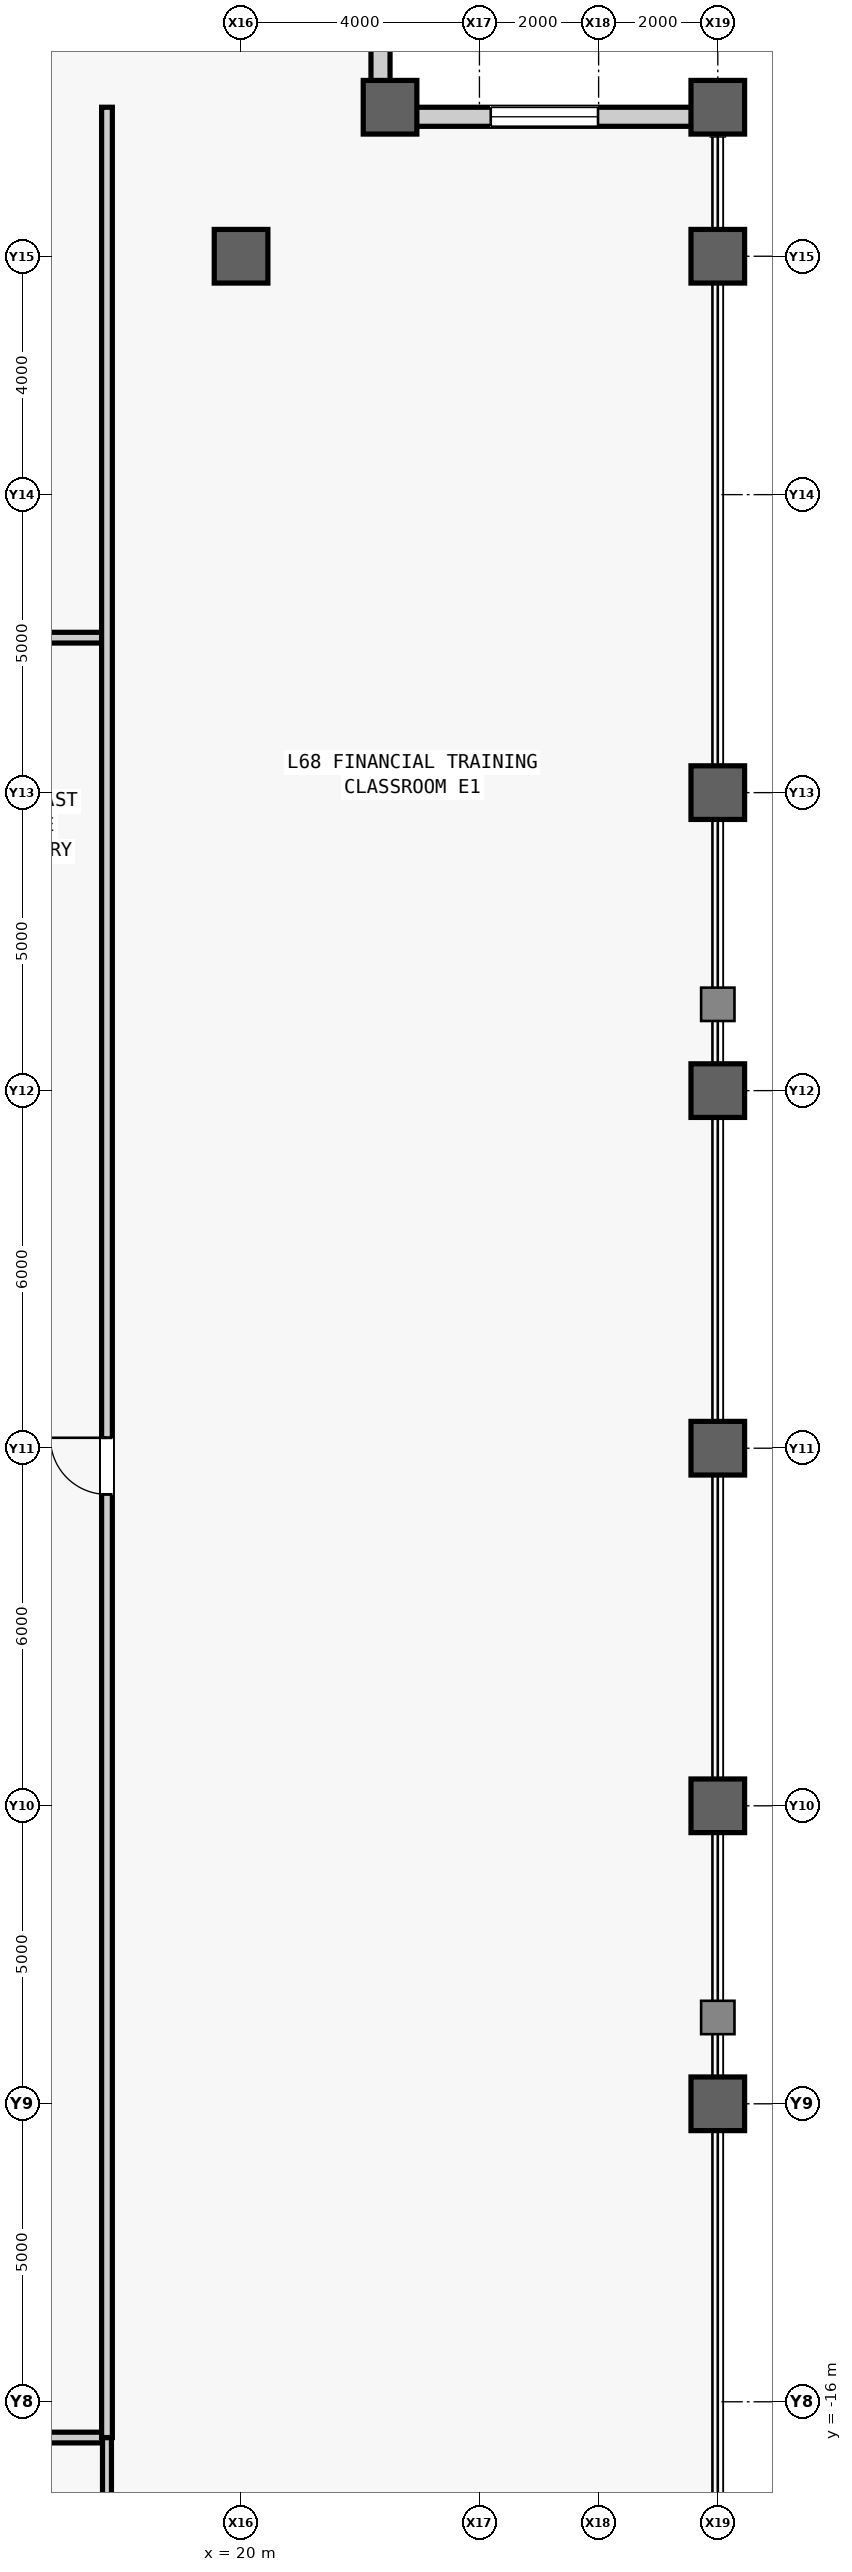
"""IFC4 building model, lengths in metres.
Left out: names, types, materials, properties, quantities, classifications, styles, units other than length and angle.
Written with IfcOpenShell. Run it as: python <this file> out.ifc"""

import sys

from ifc_helpers import new_model, si_unit, direction, frame, frame_2d, origin, origin_2d, place, context, subcontext, project, spatial, rectangle, hollow_rectangle, extrude, source, transform, mapped, element, fill, save


model = new_model("IFC4")
c1 = context("Model", 3, precision=1e-05, world=origin(), true_north=direction((0.0, 1.0)))
c2 = subcontext(c1, "Body", "Model", "MODEL_VIEW")
j1 = project(units=[si_unit("LENGTHUNIT", "METRE"), si_unit("PLANEANGLEUNIT", "RADIAN")], contexts=[c1])
p1 = place(None, origin())
s1 = spatial("IfcSite", under=j1, at=p1, CompositionType="ELEMENT")
p2 = place(p1, origin())
s2 = spatial("IfcBuilding", under=s1, at=p2, CompositionType="ELEMENT")
p3 = place(p2, frame((0.0, 0.0, 289.5)))
s3 = spatial("IfcBuildingStorey", under=s2, at=p3, CompositionType="ELEMENT", Elevation=289.5)
m1 = source(origin(), c2, "Body", "SweptSolid", [
    extrude(hollow_rectangle(XDim=0.9, YDim=0.9, WallThickness=0.05, at=origin_2d()), origin(), (0.0, 0.0, 1.0), 4.0),
])
for number, where, z_axis, x_axis in (
    (1, (20.0, 20.0, 0.0), (0.0, 0.0, 1.0), (1.0, 0.0, 0.0)),
    (2, (22.5, 22.5, 0.0), (0.0, 0.0, 1.0), (1.0, 0.0, 0.0)),
    (3, (28.0, -11.0, 0.0), (0.0, 0.0, 1.0), (1.0, 0.0, 0.0)),
    (4, (28.0, -6.0, 0.0), (0.0, 0.0, 1.0), (1.0, 0.0, 0.0)),
    (5, (28.0, 0.0, 0.0), (0.0, 0.0, 1.0), (1.0, 0.0, 0.0)),
    (6, (28.0, 6.0, 0.0), (0.0, 0.0, 1.0), (1.0, 0.0, 0.0)),
    (7, (28.0, 11.0, 0.0), (0.0, 0.0, 1.0), (1.0, 0.0, 0.0)),
    (8, (28.0, 20.0, 0.0), (0.0, 0.0, 1.0), (1.0, 0.0, 0.0)),
    (9, (28.0, 22.5, 0.0), (0.0, 0.0, 1.0), (1.0, 0.0, 0.0)),
):
    element("IfcColumn", number, at=place(p3, frame(where, z_axis=z_axis, x_axis=x_axis)), inside=s3, PredefinedType="COLUMN", context=c2, shape_type="MappedRepresentation", body=[
        mapped(m1, transform((0.0, 0.0, 0.0), scale=1.0)),
    ])
m2 = source(origin(), c2, "Body", "SweptSolid", [
    extrude(rectangle(XDim=5.18, YDim=0.32, at=frame_2d((2.59, 0.0))), origin(), (0.0, 0.0, 1.0), 3.231),
])
p4 = place(p3, frame((22.5, 22.34, 0.0), z_axis=(0.0, 0.0, 1.0), x_axis=(1.0, 0.0, 0.0)))
e10 = element("IfcWall", 10, at=p4, inside=s3, PredefinedType="STANDARD", context=c2, shape_type="MappedRepresentation", body=[
    mapped(m2, transform((0.0, 0.0, 0.0), scale=1.0)),
])
m3 = source(origin(), c2, "Body", "SweptSolid", [
    extrude(rectangle(XDim=1.8, YDim=2.4, at=frame_2d((0.9, 1.2))), frame((0.0, 0.17, 0.0), z_axis=(0.0, -1.0, 0.0), x_axis=(1.0, 0.0, 0.0)), (0.0, 0.0, 1.0), 0.34),
])
p5 = place(p4, frame((1.69, 0.0, 0.5)))
e11 = element("IfcOpeningElement", 11, at=p5, cuts=e10, PredefinedType="OPENING", context=c2, shape_type="MappedRepresentation", body=[
    mapped(m3, transform((0.0, 0.0, 0.0), scale=1.0)),
])
p6 = place(p3, frame((22.34, 22.5, 0.0), z_axis=(0.0, 0.0, 1.0), x_axis=(0.0, 1.0, 0.0)))
e12 = element("IfcWall", 12, at=p6, inside=s3, PredefinedType="STANDARD", context=c2, shape_type="MappedRepresentation", body=[
    mapped(m2, transform((0.0, 0.0, 0.0), scale=1.0)),
])
p7 = place(p6, frame((1.69, 0.0, 0.5)))
e13 = element("IfcOpeningElement", 13, at=p7, cuts=e12, PredefinedType="OPENING", context=c2, shape_type="MappedRepresentation", body=[
    mapped(m3, transform((0.0, 0.0, 0.0), scale=1.0)),
])
m4 = source(origin(), c2, "Body", "SweptSolid", [
    extrude(rectangle(XDim=2.4, YDim=0.18, at=frame_2d((1.2, 0.0))), origin(), (0.0, 0.0, 1.0), 3.78),
])
p8 = place(p3, frame((15.35, 13.6, 0.0), z_axis=(0.0, 0.0, 1.0), x_axis=(1.0, 0.0, 0.0)))
e14 = element("IfcWall", 14, at=p8, inside=s3, PredefinedType="PARTITIONING", context=c2, shape_type="MappedRepresentation", body=[
    mapped(m4, transform((0.0, 0.0, 0.0), scale=1.0)),
])
m5 = source(origin(), c2, "Body", "SweptSolid", [
    extrude(rectangle(XDim=37.55, YDim=0.18, at=frame_2d((18.775, 0.0))), origin(), (0.0, 0.0, 1.0), 3.78),
])
p9 = place(p3, frame((-19.8, -16.6, 0.0), z_axis=(0.0, 0.0, 1.0), x_axis=(1.0, 0.0, 0.0)))
e15 = element("IfcWall", 15, at=p9, inside=s3, PredefinedType="PARTITIONING", context=c2, shape_type="MappedRepresentation", body=[
    mapped(m5, transform((0.0, 0.0, 0.0), scale=1.0)),
])
m6 = source(origin(), c2, "Body", "SweptSolid", [
    extrude(rectangle(XDim=1.05, YDim=2.2, at=frame_2d((0.525, 1.1))), frame((0.0, 0.1, 0.0), z_axis=(0.0, -1.0, 0.0), x_axis=(1.0, 0.0, 0.0)), (0.0, 0.0, 1.0), 0.2),
])
p10 = place(p9, frame((4.481, 0.0, 0.0)))
e16 = element("IfcOpeningElement", 16, at=p10, cuts=e15, PredefinedType="OPENING", context=c2, shape_type="MappedRepresentation", body=[
    mapped(m6, transform((0.0, 0.0, 0.0), scale=1.0)),
])
p11 = place(p9, frame((14.119, 0.0, 0.0)))
e17 = element("IfcOpeningElement", 17, at=p11, cuts=e15, PredefinedType="OPENING", context=c2, shape_type="MappedRepresentation", body=[
    mapped(m6, transform((0.0, 0.0, 0.0), scale=1.0)),
])
p12 = place(p9, frame((24.634, 0.0, 0.0)))
e18 = element("IfcOpeningElement", 18, at=p12, cuts=e15, PredefinedType="OPENING", context=c2, shape_type="MappedRepresentation", body=[
    mapped(m6, transform((0.0, 0.0, 0.0), scale=1.0)),
])
p13 = place(p9, frame((32.745, 0.0, 0.0)))
e19 = element("IfcOpeningElement", 19, at=p13, cuts=e15, PredefinedType="OPENING", context=c2, shape_type="MappedRepresentation", body=[
    mapped(m6, transform((0.0, 0.0, 0.0), scale=1.0)),
])
m7 = source(origin(), c2, "Body", "SweptSolid", [
    extrude(rectangle(XDim=11.4, YDim=0.15, at=frame_2d((5.7, 0.0))), origin(), (0.0, 0.0, 1.0), 3.78),
])
p14 = place(p3, frame((17.75, -28.0, 0.0), z_axis=(0.0, 0.0, 1.0), x_axis=(0.0, 1.0, 0.0)))
e20 = element("IfcWall", 20, at=p14, inside=s3, PredefinedType="PARTITIONING", context=c2, shape_type="MappedRepresentation", body=[
    mapped(m7, transform((0.0, 0.0, 0.0), scale=1.0)),
])
m8 = source(origin(), c2, "Body", "SweptSolid", [
    extrude(rectangle(XDim=39.1, YDim=0.18, at=frame_2d((19.55, 0.0))), origin(), (0.0, 0.0, 1.0), 3.78),
])
p15 = place(p3, frame((17.75, -16.6, 0.0), z_axis=(0.0, 0.0, 1.0), x_axis=(0.0, 1.0, 0.0)))
e21 = element("IfcWall", 21, at=p15, inside=s3, PredefinedType="PARTITIONING", context=c2, shape_type="MappedRepresentation", body=[
    mapped(m8, transform((0.0, 0.0, 0.0), scale=1.0)),
])
m9 = source(origin(), c2, "Body", "SweptSolid", [
    extrude(rectangle(XDim=0.95, YDim=2.15, at=frame_2d((0.475, 1.075))), frame((0.0, 0.1, 0.0), z_axis=(0.0, -1.0, 0.0), x_axis=(1.0, 0.0, 0.0)), (0.0, 0.0, 1.0), 0.2),
])
p16 = place(p15, frame((15.825, 0.0, 0.0)))
e22 = element("IfcOpeningElement", 22, at=p16, cuts=e21, PredefinedType="OPENING", context=c2, shape_type="MappedRepresentation", body=[
    mapped(m9, transform((0.0, 0.0, 0.0), scale=1.0)),
])
m10 = source(origin(), c2, "Body", "SweptSolid", [
    extrude(rectangle(XDim=1.8, YDim=2.4, at=frame_2d((0.9, 1.2))), frame((0.0, 0.03, 0.0), z_axis=(0.0, -1.0, 0.0), x_axis=(1.0, 0.0, 0.0)), (0.0, 0.0, 1.0), 0.06),
])
p17 = place(p5, origin())
e23 = element("IfcWindow", 23, at=p17, inside=s3, PartitioningType="SINGLE_PANEL", PredefinedType="WINDOW", context=c2, shape_type="MappedRepresentation", body=[
    mapped(m10, transform((0.0, 0.0, 0.0), scale=1.0)),
])
fill(e11, e23)
m11 = source(origin(), c2, "Body", "SweptSolid", [
    extrude(rectangle(XDim=0.95, YDim=2.15, at=frame_2d((0.475, 1.075))), frame((0.0, 0.025, 0.0), z_axis=(0.0, -1.0, 0.0), x_axis=(1.0, 0.0, 0.0)), (0.0, 0.0, 1.0), 0.05),
])
p18 = place(p16, origin())
e24 = element("IfcDoor", 24, at=p18, inside=s3, OperationType="SINGLE_SWING_RIGHT", PredefinedType="DOOR", context=c2, shape_type="MappedRepresentation", body=[
    mapped(m11, transform((0.0, 0.0, 0.0), scale=1.0)),
])
fill(e22, e24)
save(model, sys.argv[1])
